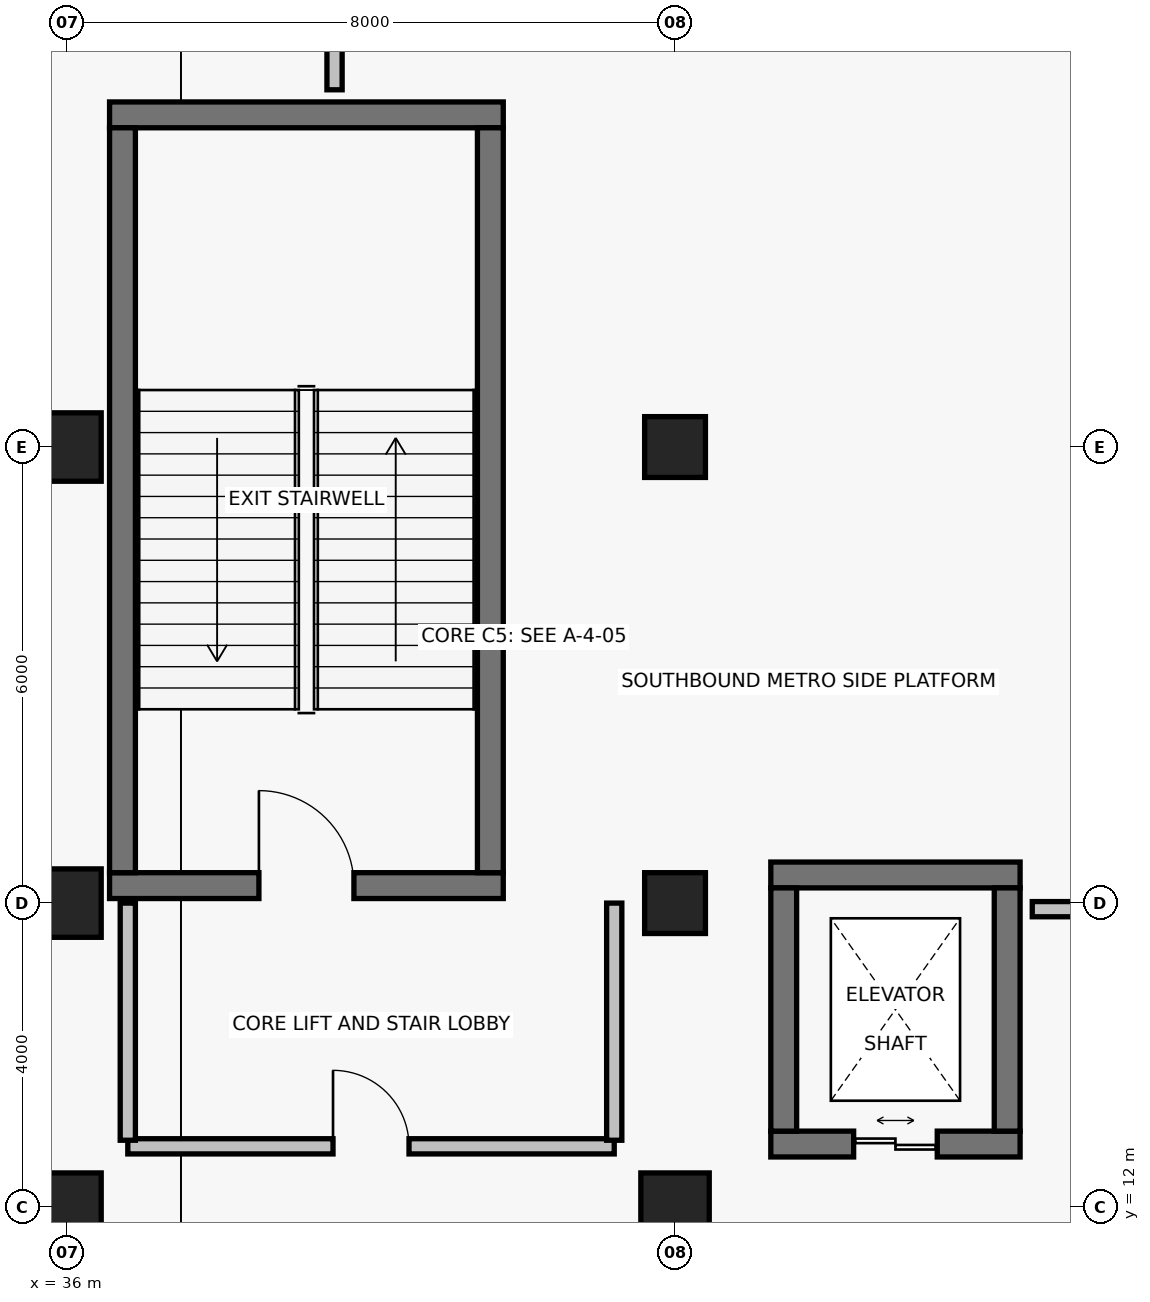
"""IFC4 building model, lengths in metres.
Left out: names, types, materials, properties, quantities, classifications, styles, units other than length and angle.
Written with IfcOpenShell. Run it as: python <this file> out.ifc"""

import sys

from ifc_helpers import new_model, si_unit, direction, frame, frame_2d, origin, origin_2d, place, context, subcontext, project, spatial, rectangle, extrude, element, fill, save


model = new_model("IFC4")
c1 = context("Model", 3, precision=1e-05, world=origin(), true_north=direction((0.0, 1.0)))
c2 = subcontext(c1, "Body", "Model", "MODEL_VIEW")
j1 = project(units=[si_unit("LENGTHUNIT", "METRE"), si_unit("PLANEANGLEUNIT", "RADIAN")], contexts=[c1])
p1 = place(None, origin())
s1 = spatial("IfcSite", under=j1, at=p1, CompositionType="ELEMENT")
p2 = place(p1, origin())
s2 = spatial("IfcBuilding", under=s1, at=p2, CompositionType="ELEMENT")
p3 = place(p2, frame((0.0, 0.0, -10.4)))
s3 = spatial("IfcBuildingStorey", under=s2, at=p3, CompositionType="ELEMENT", Elevation=-10.4)
for number, where, z_axis, x_axis in (
    (1, (36.0, 12.0, 0.0), (0.0, 0.0, 1.0), (1.0, 0.0, 0.0)),
    (2, (36.0, 16.0, 0.0), (0.0, 0.0, 1.0), (1.0, 0.0, 0.0)),
    (3, (36.0, 22.0, 0.0), (0.0, 0.0, 1.0), (1.0, 0.0, 0.0)),
    (4, (44.0, 12.0, 0.0), (0.0, 0.0, 1.0), (1.0, 0.0, 0.0)),
):
    element("IfcColumn", number, at=place(p3, frame(where, z_axis=z_axis, x_axis=x_axis)), inside=s3, PredefinedType="COLUMN", context=c2, shape_type="SweptSolid", body=[
        extrude(rectangle(XDim=0.9, YDim=0.9, at=origin_2d()), origin(), (0.0, 0.0, 1.0), 5.6),
    ])
for number, where, z_axis, x_axis in (
    (5, (44.0, 16.0, 0.0), (0.0, 0.0, 1.0), (1.0, 0.0, 0.0)),
    (6, (44.0, 22.0, 0.0), (0.0, 0.0, 1.0), (1.0, 0.0, 0.0)),
):
    element("IfcColumn", number, at=place(p3, frame(where, z_axis=z_axis, x_axis=x_axis)), inside=s3, PredefinedType="COLUMN", context=c2, shape_type="SweptSolid", body=[
        extrude(rectangle(XDim=0.8, YDim=0.8, at=origin_2d()), origin(), (0.0, 0.0, 1.0), 5.6),
    ])
p4 = place(p3, frame((36.56, 16.23, 0.0), z_axis=(0.0, 0.0, 1.0), x_axis=(1.0, 0.0, 0.0)))
e7 = element("IfcWall", 7, at=p4, inside=s3, PredefinedType="SHEAR", context=c2, shape_type="SweptSolid", body=[
    extrude(rectangle(XDim=5.18, YDim=0.34, at=frame_2d((2.59, 0.0))), origin(), (0.0, 0.0, 1.0), 5.15),
])
p5 = place(p4, frame((1.965, 0.0, 0.0)))
e8 = element("IfcOpeningElement", 8, at=p5, cuts=e7, PredefinedType="OPENING", context=c2, shape_type="SweptSolid", body=[
    extrude(rectangle(XDim=1.25, YDim=2.2, at=frame_2d((0.625, 1.1))), frame((0.0, 0.185, 0.0), z_axis=(0.0, -1.0, 0.0), x_axis=(1.0, 0.0, 0.0)), (0.0, 0.0, 1.0), 0.37),
])
p6 = place(p3, frame((41.74, 26.37, 0.0), z_axis=(0.0, 0.0, 1.0), x_axis=(-1.0, 0.0, 0.0)))
e9 = element("IfcWall", 9, at=p6, inside=s3, PredefinedType="SHEAR", context=c2, shape_type="SweptSolid", body=[
    extrude(rectangle(XDim=5.18, YDim=0.34, at=frame_2d((2.59, 0.0))), origin(), (0.0, 0.0, 1.0), 5.15),
])
for number, where, z_axis, x_axis in (
    (10, (36.73, 26.2, 0.0), (0.0, 0.0, 1.0), (0.0, -1.0, 0.0)),
    (11, (41.57, 16.4, 0.0), (0.0, 0.0, 1.0), (0.0, 1.0, 0.0)),
):
    element("IfcWall", number, at=place(p3, frame(where, z_axis=z_axis, x_axis=x_axis)), inside=s3, PredefinedType="SHEAR", context=c2, shape_type="SweptSolid", body=[
        extrude(rectangle(XDim=9.8, YDim=0.34, at=frame_2d((4.9, 0.0))), origin(), (0.0, 0.0, 1.0), 5.15),
    ])
p7 = place(p3, frame((45.26, 12.83, 0.0), z_axis=(0.0, 0.0, 1.0), x_axis=(1.0, 0.0, 0.0)))
e12 = element("IfcWall", 12, at=p7, inside=s3, PredefinedType="SHEAR", context=c2, shape_type="SweptSolid", body=[
    extrude(rectangle(XDim=3.28, YDim=0.34, at=frame_2d((1.64, 0.0))), origin(), (0.0, 0.0, 1.0), 5.15),
])
p8 = place(p7, frame((1.09, 0.0, 0.0)))
e13 = element("IfcOpeningElement", 13, at=p8, cuts=e12, PredefinedType="OPENING", context=c2, shape_type="SweptSolid", body=[
    extrude(rectangle(XDim=1.1, YDim=2.2, at=frame_2d((0.55, 1.1))), frame((0.0, 0.185, 0.0), z_axis=(0.0, -1.0, 0.0), x_axis=(1.0, 0.0, 0.0)), (0.0, 0.0, 1.0), 0.37),
])
p9 = place(p3, frame((48.54, 16.37, 0.0), z_axis=(0.0, 0.0, 1.0), x_axis=(-1.0, 0.0, 0.0)))
e14 = element("IfcWall", 14, at=p9, inside=s3, PredefinedType="SHEAR", context=c2, shape_type="SweptSolid", body=[
    extrude(rectangle(XDim=3.28, YDim=0.34, at=frame_2d((1.64, 0.0))), origin(), (0.0, 0.0, 1.0), 5.15),
])
for number, where, z_axis, x_axis in (
    (15, (45.43, 16.2, 0.0), (0.0, 0.0, 1.0), (0.0, -1.0, 0.0)),
    (16, (48.37, 13.0, 0.0), (0.0, 0.0, 1.0), (0.0, 1.0, 0.0)),
):
    element("IfcWall", number, at=place(p3, frame(where, z_axis=z_axis, x_axis=x_axis)), inside=s3, PredefinedType="SHEAR", context=c2, shape_type="SweptSolid", body=[
        extrude(rectangle(XDim=3.2, YDim=0.34, at=frame_2d((1.6, 0.0))), origin(), (0.0, 0.0, 1.0), 5.15),
    ])
p10 = place(p3, frame((36.8, 12.8, 0.0), z_axis=(0.0, 0.0, 1.0), x_axis=(1.0, 0.0, 0.0)))
e17 = element("IfcWall", 17, at=p10, inside=s3, PredefinedType="PARTITIONING", context=c2, shape_type="SweptSolid", body=[
    extrude(rectangle(XDim=6.4, YDim=0.2, at=frame_2d((3.2, 0.0))), origin(), (0.0, 0.0, 1.0), 4.877),
])
p11 = place(p10, frame((2.7, 0.0, 0.0)))
e18 = element("IfcOpeningElement", 18, at=p11, cuts=e17, PredefinedType="OPENING", context=c2, shape_type="SweptSolid", body=[
    extrude(rectangle(XDim=1.0, YDim=2.15, at=frame_2d((0.5, 1.075))), frame((0.0, 0.115, 0.0), z_axis=(0.0, -1.0, 0.0), x_axis=(1.0, 0.0, 0.0)), (0.0, 0.0, 1.0), 0.23),
])
for number, where, z_axis, x_axis in (
    (19, (36.8, 16.0, 0.0), (0.0, 0.0, 1.0), (0.0, -1.0, 0.0)),
    (20, (43.2, 12.88, 0.0), (0.0, 0.0, 1.0), (0.0, 1.0, 0.0)),
):
    element("IfcWall", number, at=place(p3, frame(where, z_axis=z_axis, x_axis=x_axis)), inside=s3, PredefinedType="PARTITIONING", context=c2, shape_type="SweptSolid", body=[
        extrude(rectangle(XDim=3.12, YDim=0.2, at=frame_2d((1.56, 0.0))), origin(), (0.0, 0.0, 1.0), 4.48),
    ])
p12 = place(p3, frame((39.52, 39.92, 0.0), z_axis=(0.0, 0.0, 1.0), x_axis=(0.0, -1.0, 0.0)))
e21 = element("IfcWall", 21, at=p12, inside=s3, PredefinedType="PARTITIONING", context=c2, shape_type="SweptSolid", body=[
    extrude(rectangle(XDim=13.22, YDim=0.2, at=frame_2d((6.61, 0.0))), origin(), (0.0, 0.0, 1.0), 4.48),
])
p13 = place(p12, frame((6.11, 0.0, 0.0)))
e22 = element("IfcOpeningElement", 22, at=p13, cuts=e21, PredefinedType="OPENING", context=c2, shape_type="SweptSolid", body=[
    extrude(rectangle(XDim=1.0, YDim=2.15, at=frame_2d((0.5, 1.075))), frame((0.0, 0.115, 0.0), z_axis=(0.0, -1.0, 0.0), x_axis=(1.0, 0.0, 0.0)), (0.0, 0.0, 1.0), 0.23),
])
p14 = place(p3, frame((48.7, 15.92, 0.0), z_axis=(0.0, 0.0, 1.0), x_axis=(1.0, 0.0, 0.0)))
e23 = element("IfcWall", 23, at=p14, inside=s3, PredefinedType="PARTITIONING", context=c2, shape_type="SweptSolid", body=[
    extrude(rectangle(XDim=45.6, YDim=0.2, at=frame_2d((22.8, 0.0))), origin(), (0.0, 0.0, 1.0), 4.48),
])
p15 = place(p14, frame((22.25, 0.0, 0.0)))
e24 = element("IfcOpeningElement", 24, at=p15, cuts=e23, PredefinedType="OPENING", context=c2, shape_type="SweptSolid", body=[
    extrude(rectangle(XDim=1.1, YDim=2.15, at=frame_2d((0.55, 1.075))), frame((0.0, 0.115, 0.0), z_axis=(0.0, -1.0, 0.0), x_axis=(1.0, 0.0, 0.0)), (0.0, 0.0, 1.0), 0.23),
])
p16 = place(p5, origin())
e25 = element("IfcDoor", 25, at=p16, inside=s3, OperationType="SINGLE_SWING_LEFT", PredefinedType="DOOR", context=c2, shape_type="SweptSolid", body=[
    extrude(rectangle(XDim=1.25, YDim=2.2, at=frame_2d((0.625, 1.1))), frame((0.0, 0.025, 0.0), z_axis=(0.0, -1.0, 0.0), x_axis=(1.0, 0.0, 0.0)), (0.0, 0.0, 1.0), 0.05),
])
fill(e8, e25)
p17 = place(p8, origin())
e26 = element("IfcDoor", 26, at=p17, inside=s3, OperationType="DOUBLE_DOOR_SLIDING", PredefinedType="DOOR", context=c2, shape_type="SweptSolid", body=[
    extrude(rectangle(XDim=1.1, YDim=2.2, at=frame_2d((0.55, 1.1))), frame((0.0, 0.025, 0.0), z_axis=(0.0, -1.0, 0.0), x_axis=(1.0, 0.0, 0.0)), (0.0, 0.0, 1.0), 0.05),
])
fill(e13, e26)
p18 = place(p11, origin())
e27 = element("IfcDoor", 27, at=p18, inside=s3, OperationType="SINGLE_SWING_LEFT", PredefinedType="DOOR", context=c2, shape_type="SweptSolid", body=[
    extrude(rectangle(XDim=1.0, YDim=2.15, at=frame_2d((0.5, 1.075))), frame((0.0, 0.025, 0.0), z_axis=(0.0, -1.0, 0.0), x_axis=(1.0, 0.0, 0.0)), (0.0, 0.0, 1.0), 0.05),
])
fill(e18, e27)
save(model, sys.argv[1])
